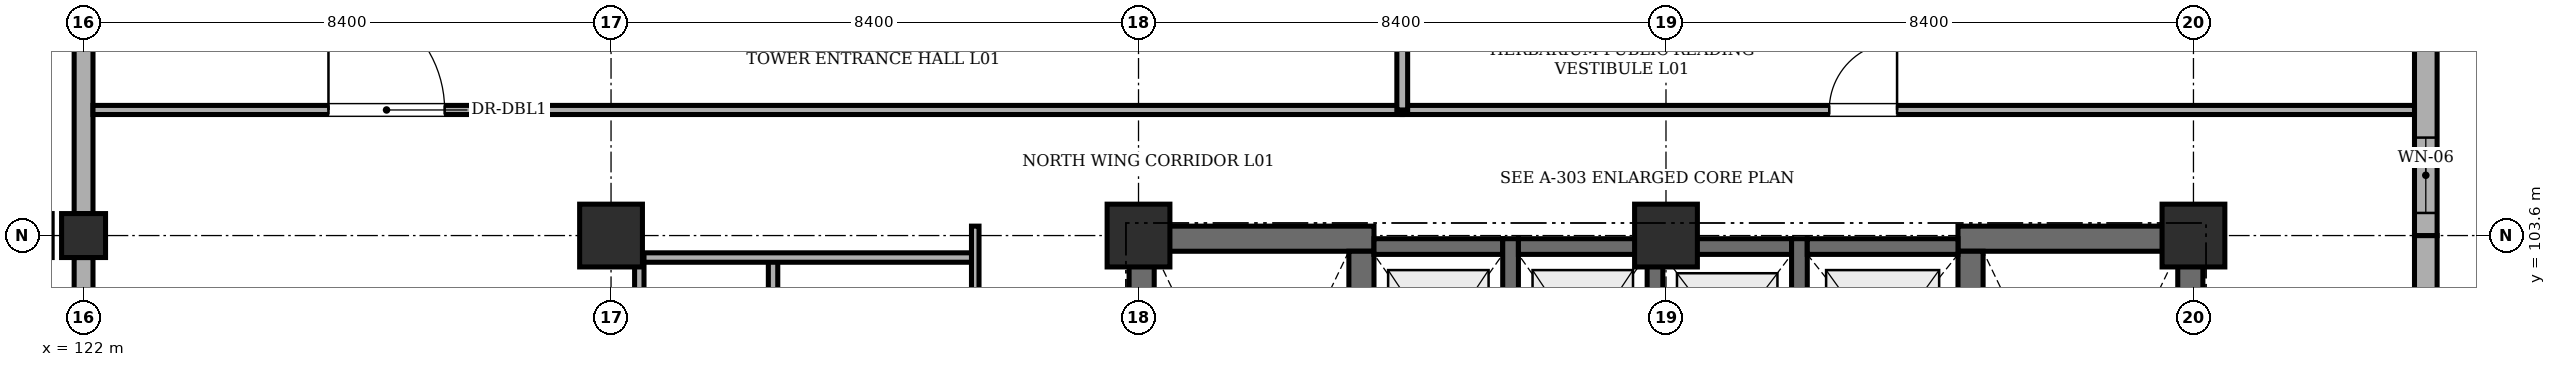
"""IFC4 building model, lengths in metres.
Left out: names, types, materials, properties, quantities, classifications, styles, units other than length and angle.
Written with IfcOpenShell. Run it as: python <this file> out.ifc"""

import sys

from ifc_helpers import new_model, si_unit, direction, frame, frame_2d, origin, origin_2d, place, context, subcontext, project, spatial, rectangle, extrude, element, fill, save


model = new_model("IFC4")
c1 = context("Model", 3, precision=1e-05, world=origin(), true_north=direction((0.0, 1.0)))
c2 = subcontext(c1, "Body", "Model", "MODEL_VIEW")
j1 = project(units=[si_unit("LENGTHUNIT", "METRE"), si_unit("PLANEANGLEUNIT", "RADIAN")], contexts=[c1])
p1 = place(None, origin())
s1 = spatial("IfcSite", under=j1, at=p1, CompositionType="ELEMENT")
p2 = place(p1, origin())
s2 = spatial("IfcBuilding", under=s1, at=p2, CompositionType="ELEMENT")
p3 = place(p2, origin())
s3 = spatial("IfcBuildingStorey", under=s2, at=p3, CompositionType="ELEMENT", Elevation=0.0)
p4 = place(p3, frame((122.0, 103.6, 0.0), z_axis=(0.0, 0.0, 1.0), x_axis=(1.0, 0.0, 0.0)))
e1 = element("IfcColumn", 1, at=p4, inside=s3, PredefinedType="COLUMN", context=c2, shape_type="SweptSolid", body=[
    extrude(rectangle(XDim=0.7, YDim=0.7, at=origin_2d()), origin(), (0.0, 0.0, 1.0), 5.18),
])
for number, where, z_axis, x_axis in (
    (2, (130.4, 103.6, 0.0), (0.0, 0.0, 1.0), (1.0, 0.0, 0.0)),
    (3, (138.8, 103.6, 0.0), (0.0, 0.0, 1.0), (1.0, 0.0, 0.0)),
    (4, (147.2, 103.6, 0.0), (0.0, 0.0, 1.0), (1.0, 0.0, 0.0)),
    (5, (155.6, 103.6, 0.0), (0.0, 0.0, 1.0), (1.0, 0.0, 0.0)),
):
    element("IfcColumn", number, at=place(p3, frame(where, z_axis=z_axis, x_axis=x_axis)), inside=s3, PredefinedType="COLUMN", context=c2, shape_type="SweptSolid", body=[
        extrude(rectangle(XDim=1.0, YDim=1.0, at=origin_2d()), origin(), (0.0, 0.0, 1.0), 5.18),
    ])
p5 = place(p3, frame((138.65, 103.55, 0.0), z_axis=(0.0, 0.0, 1.0), x_axis=(1.0, 0.0, 0.0)))
e6 = element("IfcWall", 6, at=p5, inside=s3, PredefinedType="SHEAR", context=c2, shape_type="SweptSolid", body=[
    extrude(rectangle(XDim=3.9, YDim=0.4, at=frame_2d((1.95, 0.0))), origin(), (0.0, 0.0, 1.0), 5.18),
])
p6 = place(p3, frame((138.85, 95.45, 0.0), z_axis=(0.0, 0.0, 1.0), x_axis=(0.0, 1.0, 0.0)))
e7 = element("IfcWall", 7, at=p6, inside=s3, PredefinedType="SHEAR", context=c2, shape_type="SweptSolid", body=[
    extrude(rectangle(XDim=7.9, YDim=0.4, at=frame_2d((3.95, 0.0))), origin(), (0.0, 0.0, 1.0), 5.18),
])
p7 = place(p3, frame((142.35, 95.45, 0.0), z_axis=(0.0, 0.0, 1.0), x_axis=(0.0, 1.0, 0.0)))
e8 = element("IfcWall", 8, at=p7, inside=s3, PredefinedType="SHEAR", context=c2, shape_type="SweptSolid", body=[
    extrude(rectangle(XDim=7.9, YDim=0.4, at=frame_2d((3.95, 0.0))), origin(), (0.0, 0.0, 1.0), 5.18),
])
p8 = place(p7, frame((0.22, 0.0, 0.0)))
e9 = element("IfcOpeningElement", 9, at=p8, cuts=e8, PredefinedType="OPENING", context=c2, shape_type="SweptSolid", body=[
    extrude(rectangle(XDim=1.15, YDim=2.15, at=frame_2d((0.575, 1.075))), frame((0.0, 0.21, 0.0), z_axis=(0.0, -1.0, 0.0), x_axis=(1.0, 0.0, 0.0)), (0.0, 0.0, 1.0), 0.42),
])
p9 = place(p3, frame((151.85, 103.55, 0.0), z_axis=(0.0, 0.0, 1.0), x_axis=(1.0, 0.0, 0.0)))
e10 = element("IfcWall", 10, at=p9, inside=s3, PredefinedType="SHEAR", context=c2, shape_type="SweptSolid", body=[
    extrude(rectangle(XDim=3.9, YDim=0.4, at=frame_2d((1.95, 0.0))), origin(), (0.0, 0.0, 1.0), 5.18),
])
p10 = place(p3, frame((152.05, 95.45, 0.0), z_axis=(0.0, 0.0, 1.0), x_axis=(0.0, 1.0, 0.0)))
e11 = element("IfcWall", 11, at=p10, inside=s3, PredefinedType="SHEAR", context=c2, shape_type="SweptSolid", body=[
    extrude(rectangle(XDim=7.9, YDim=0.4, at=frame_2d((3.95, 0.0))), origin(), (0.0, 0.0, 1.0), 5.18),
])
p11 = place(p10, frame((0.35, 0.0, 0.0)))
e12 = element("IfcOpeningElement", 12, at=p11, cuts=e11, PredefinedType="OPENING", context=c2, shape_type="SweptSolid", body=[
    extrude(rectangle(XDim=1.15, YDim=2.15, at=frame_2d((0.575, 1.075))), frame((0.0, 0.21, 0.0), z_axis=(0.0, -1.0, 0.0), x_axis=(1.0, 0.0, 0.0)), (0.0, 0.0, 1.0), 0.42),
])
p12 = place(p3, frame((155.55, 95.45, 0.0), z_axis=(0.0, 0.0, 1.0), x_axis=(0.0, 1.0, 0.0)))
e13 = element("IfcWall", 13, at=p12, inside=s3, PredefinedType="SHEAR", context=c2, shape_type="SweptSolid", body=[
    extrude(rectangle(XDim=7.9, YDim=0.4, at=frame_2d((3.95, 0.0))), origin(), (0.0, 0.0, 1.0), 5.18),
])
p13 = place(p3, frame((142.55, 103.425, 0.0), z_axis=(0.0, 0.0, 1.0), x_axis=(1.0, 0.0, 0.0)))
e14 = element("IfcWall", 14, at=p13, inside=s3, PredefinedType="SHEAR", context=c2, shape_type="SweptSolid", body=[
    extrude(rectangle(XDim=2.05, YDim=0.25, at=frame_2d((1.025, 0.0))), origin(), (0.0, 0.0, 1.0), 5.18),
])
p14 = place(p3, frame((144.725, 100.15, 0.0), z_axis=(0.0, 0.0, 1.0), x_axis=(0.0, 1.0, 0.0)))
e15 = element("IfcWall", 15, at=p14, inside=s3, PredefinedType="SHEAR", context=c2, shape_type="SweptSolid", body=[
    extrude(rectangle(XDim=3.4, YDim=0.25, at=frame_2d((1.7, 0.0))), origin(), (0.0, 0.0, 1.0), 5.18),
])
p15 = place(p3, frame((144.85, 103.425, 0.0), z_axis=(0.0, 0.0, 1.0), x_axis=(1.0, 0.0, 0.0)))
e16 = element("IfcWall", 16, at=p15, inside=s3, PredefinedType="SHEAR", context=c2, shape_type="SweptSolid", body=[
    extrude(rectangle(XDim=2.05, YDim=0.25, at=frame_2d((1.025, 0.0))), origin(), (0.0, 0.0, 1.0), 5.18),
])
p16 = place(p3, frame((147.025, 100.15, 0.0), z_axis=(0.0, 0.0, 1.0), x_axis=(0.0, 1.0, 0.0)))
e17 = element("IfcWall", 17, at=p16, inside=s3, PredefinedType="SHEAR", context=c2, shape_type="SweptSolid", body=[
    extrude(rectangle(XDim=3.4, YDim=0.25, at=frame_2d((1.7, 0.0))), origin(), (0.0, 0.0, 1.0), 5.18),
])
p17 = place(p3, frame((147.15, 103.425, 0.0), z_axis=(0.0, 0.0, 1.0), x_axis=(1.0, 0.0, 0.0)))
e18 = element("IfcWall", 18, at=p17, inside=s3, PredefinedType="SHEAR", context=c2, shape_type="SweptSolid", body=[
    extrude(rectangle(XDim=2.05, YDim=0.25, at=frame_2d((1.025, 0.0))), origin(), (0.0, 0.0, 1.0), 5.18),
])
p18 = place(p3, frame((149.325, 100.35, 0.0), z_axis=(0.0, 0.0, 1.0), x_axis=(0.0, 1.0, 0.0)))
e19 = element("IfcWall", 19, at=p18, inside=s3, PredefinedType="SHEAR", context=c2, shape_type="SweptSolid", body=[
    extrude(rectangle(XDim=3.2, YDim=0.25, at=frame_2d((1.6, 0.0))), origin(), (0.0, 0.0, 1.0), 5.18),
])
p19 = place(p3, frame((149.45, 103.425, 0.0), z_axis=(0.0, 0.0, 1.0), x_axis=(1.0, 0.0, 0.0)))
e20 = element("IfcWall", 20, at=p19, inside=s3, PredefinedType="SHEAR", context=c2, shape_type="SweptSolid", body=[
    extrude(rectangle(XDim=2.4, YDim=0.25, at=frame_2d((1.2, 0.0))), origin(), (0.0, 0.0, 1.0), 5.18),
])
p20 = place(p3, frame((159.3, 103.6, 0.0), z_axis=(0.0, 0.0, 1.0), x_axis=(0.0, -1.0, 0.0)))
e21 = element("IfcWall", 21, at=p20, inside=s3, PredefinedType="STANDARD", context=c2, shape_type="SweptSolid", body=[
    extrude(rectangle(XDim=8.4, YDim=0.36, at=frame_2d((4.2, 0.0))), origin(), (0.0, 0.0, 1.0), 4.78),
])
p21 = place(p20, frame((1.15, 0.0, 1.1)))
e22 = element("IfcOpeningElement", 22, at=p21, cuts=e21, PredefinedType="OPENING", context=c2, shape_type="SweptSolid", body=[
    extrude(rectangle(XDim=1.4, YDim=1.4, at=frame_2d((0.7, 0.7))), frame((0.0, 0.19, 0.0), z_axis=(0.0, -1.0, 0.0), x_axis=(1.0, 0.0, 0.0)), (0.0, 0.0, 1.0), 0.38),
])
p22 = place(p3, frame((159.3, 107.11, 0.0), z_axis=(0.0, 0.0, 1.0), x_axis=(0.0, -1.0, 0.0)))
e23 = element("IfcWall", 23, at=p22, inside=s3, PredefinedType="STANDARD", context=c2, shape_type="SweptSolid", body=[
    extrude(rectangle(XDim=3.51, YDim=0.36, at=frame_2d((1.755, 0.0))), origin(), (0.0, 0.0, 1.0), 4.78),
])
p23 = place(p22, frame((1.95, 0.0, 1.1)))
e24 = element("IfcOpeningElement", 24, at=p23, cuts=e23, PredefinedType="OPENING", context=c2, shape_type="SweptSolid", body=[
    extrude(rectangle(XDim=1.2, YDim=1.8, at=frame_2d((0.6, 0.9))), frame((0.0, 0.19, 0.0), z_axis=(0.0, -1.0, 0.0), x_axis=(1.0, 0.0, 0.0)), (0.0, 0.0, 1.0), 0.38),
])
p24 = place(p3, frame((122.0, 95.55, 0.0), z_axis=(0.0, 0.0, 1.0), x_axis=(0.0, 1.0, 0.0)))
e25 = element("IfcWall", 25, at=p24, inside=s3, PredefinedType="STANDARD", context=c2, shape_type="SweptSolid", body=[
    extrude(rectangle(XDim=7.7, YDim=0.3, at=frame_2d((3.85, 0.0))), origin(), (0.0, 0.0, 1.0), 4.43),
])
p25 = place(p3, frame((122.0, 103.95, 0.0), z_axis=(0.0, 0.0, 1.0), x_axis=(0.0, 1.0, 0.0)))
e26 = element("IfcWall", 26, at=p25, inside=s3, PredefinedType="STANDARD", context=c2, shape_type="SweptSolid", body=[
    extrude(rectangle(XDim=3.54, YDim=0.3, at=frame_2d((1.77, 0.0))), origin(), (0.0, 0.0, 1.0), 4.43),
])
p26 = place(p3, frame((132.98, 94.68, 0.0), z_axis=(0.0, 0.0, 1.0), x_axis=(0.0, 1.0, 0.0)))
e27 = element("IfcWall", 27, at=p26, inside=s3, PredefinedType="PARTITIONING", context=c2, shape_type="SweptSolid", body=[
    extrude(rectangle(XDim=8.57, YDim=0.15, at=frame_2d((4.285, 0.0))), origin(), (0.0, 0.0, 1.0), 5.18),
])
p27 = place(p26, frame((0.9, 0.0, 0.0)))
e28 = element("IfcOpeningElement", 28, at=p27, cuts=e27, PredefinedType="OPENING", context=c2, shape_type="SweptSolid", body=[
    extrude(rectangle(XDim=1.0, YDim=2.12, at=frame_2d((0.5, 1.06))), frame((0.0, 0.085, 0.0), z_axis=(0.0, -1.0, 0.0), x_axis=(1.0, 0.0, 0.0)), (0.0, 0.0, 1.0), 0.17),
])
p28 = place(p26, frame((3.7, 0.0, 0.0)))
e29 = element("IfcOpeningElement", 29, at=p28, cuts=e27, PredefinedType="OPENING", context=c2, shape_type="SweptSolid", body=[
    extrude(rectangle(XDim=0.92, YDim=2.1, at=frame_2d((0.46, 1.05))), frame((0.0, 0.085, 0.0), z_axis=(0.0, -1.0, 0.0), x_axis=(1.0, 0.0, 0.0)), (0.0, 0.0, 1.0), 0.17),
])
p29 = place(p26, frame((6.5, 0.0, 0.0)))
e30 = element("IfcOpeningElement", 30, at=p29, cuts=e27, PredefinedType="OPENING", context=c2, shape_type="SweptSolid", body=[
    extrude(rectangle(XDim=0.92, YDim=2.1, at=frame_2d((0.46, 1.05))), frame((0.0, 0.085, 0.0), z_axis=(0.0, -1.0, 0.0), x_axis=(1.0, 0.0, 0.0)), (0.0, 0.0, 1.0), 0.17),
])
p30 = place(p3, frame((130.85, 103.25, 0.0), z_axis=(0.0, 0.0, 1.0), x_axis=(1.0, 0.0, 0.0)))
e31 = element("IfcWall", 31, at=p30, inside=s3, PredefinedType="PARTITIONING", context=c2, shape_type="SweptSolid", body=[
    extrude(rectangle(XDim=5.35, YDim=0.15, at=frame_2d((2.675, 0.0))), origin(), (0.0, 0.0, 1.0), 5.18),
])
p31 = place(p3, frame((130.85, 94.68, 0.0), z_axis=(0.0, 0.0, 1.0), x_axis=(0.0, 1.0, 0.0)))
e32 = element("IfcWall", 32, at=p31, inside=s3, PredefinedType="PARTITIONING", context=c2, shape_type="SweptSolid", body=[
    extrude(rectangle(XDim=8.57, YDim=0.15, at=frame_2d((4.285, 0.0))), origin(), (0.0, 0.0, 1.0), 5.18),
])
p32 = place(p3, frame((136.2, 94.68, 0.0), z_axis=(0.0, 0.0, 1.0), x_axis=(0.0, 1.0, 0.0)))
e33 = element("IfcWall", 33, at=p32, inside=s3, PredefinedType="PARTITIONING", context=c2, shape_type="SweptSolid", body=[
    extrude(rectangle(XDim=9.07, YDim=0.12, at=frame_2d((4.535, 0.0))), origin(), (0.0, 0.0, 1.0), 5.18),
])
p33 = place(p3, frame((122.15, 105.6, 0.0), z_axis=(0.0, 0.0, 1.0), x_axis=(1.0, 0.0, 0.0)))
e34 = element("IfcWall", 34, at=p33, inside=s3, PredefinedType="PARTITIONING", context=c2, shape_type="SweptSolid", body=[
    extrude(rectangle(XDim=20.85, YDim=0.145, at=frame_2d((10.425, 0.0))), origin(), (0.0, 0.0, 1.0), 5.18),
])
p34 = place(p33, frame((3.75, 0.0, 0.0)))
e35 = element("IfcOpeningElement", 35, at=p34, cuts=e34, PredefinedType="OPENING", context=c2, shape_type="SweptSolid", body=[
    extrude(rectangle(XDim=1.85, YDim=2.25, at=frame_2d((0.925, 1.125))), frame((0.0, 0.083, 0.0), z_axis=(0.0, -1.0, 0.0), x_axis=(1.0, 0.0, 0.0)), (0.0, 0.0, 1.0), 0.165),
])
p35 = place(p3, frame((143.0, 105.6, 0.0), z_axis=(0.0, 0.0, 1.0), x_axis=(1.0, 0.0, 0.0)))
e36 = element("IfcWall", 36, at=p35, inside=s3, PredefinedType="PARTITIONING", context=c2, shape_type="SweptSolid", body=[
    extrude(rectangle(XDim=16.12, YDim=0.145, at=frame_2d((8.06, 0.0))), origin(), (0.0, 0.0, 1.0), 5.18),
])
p36 = place(p35, frame((6.8, 0.0, 0.0)))
e37 = element("IfcOpeningElement", 37, at=p36, cuts=e36, PredefinedType="OPENING", context=c2, shape_type="SweptSolid", body=[
    extrude(rectangle(XDim=1.08, YDim=2.15, at=frame_2d((0.54, 1.075))), frame((0.0, 0.083, 0.0), z_axis=(0.0, -1.0, 0.0), x_axis=(1.0, 0.0, 0.0)), (0.0, 0.0, 1.0), 0.165),
])
p37 = place(p3, frame((143.0, 105.6, 0.0), z_axis=(0.0, 0.0, 1.0), x_axis=(0.0, 1.0, 0.0)))
e38 = element("IfcWall", 38, at=p37, inside=s3, PredefinedType="PARTITIONING", context=c2, shape_type="SweptSolid", body=[
    extrude(rectangle(XDim=1.52, YDim=0.172, at=frame_2d((0.76, 0.0))), origin(), (0.0, 0.0, 1.0), 4.78),
])
p38 = place(p23, origin())
e39 = element("IfcWindow", 39, at=p38, inside=s3, PartitioningType="SINGLE_PANEL", PredefinedType="WINDOW", context=c2, shape_type="SweptSolid", body=[
    extrude(rectangle(XDim=1.2, YDim=1.8, at=frame_2d((0.6, 0.9))), frame((0.0, 0.03, 0.0), z_axis=(0.0, -1.0, 0.0), x_axis=(1.0, 0.0, 0.0)), (0.0, 0.0, 1.0), 0.06),
])
fill(e24, e39)
p39 = place(p34, origin())
e40 = element("IfcDoor", 40, at=p39, inside=s3, OperationType="SINGLE_SWING_LEFT", PredefinedType="DOOR", context=c2, shape_type="SweptSolid", body=[
    extrude(rectangle(XDim=1.85, YDim=2.25, at=frame_2d((0.925, 1.125))), frame((0.0, 0.025, 0.0), z_axis=(0.0, -1.0, 0.0), x_axis=(1.0, 0.0, 0.0)), (0.0, 0.0, 1.0), 0.05),
])
fill(e35, e40)
p40 = place(p36, origin())
e41 = element("IfcDoor", 41, at=p40, inside=s3, OperationType="SINGLE_SWING_RIGHT", PredefinedType="DOOR", context=c2, shape_type="SweptSolid", body=[
    extrude(rectangle(XDim=1.08, YDim=2.15, at=frame_2d((0.54, 1.075))), frame((0.0, 0.025, 0.0), z_axis=(0.0, -1.0, 0.0), x_axis=(1.0, 0.0, 0.0)), (0.0, 0.0, 1.0), 0.05),
])
fill(e37, e41)
save(model, sys.argv[1])
